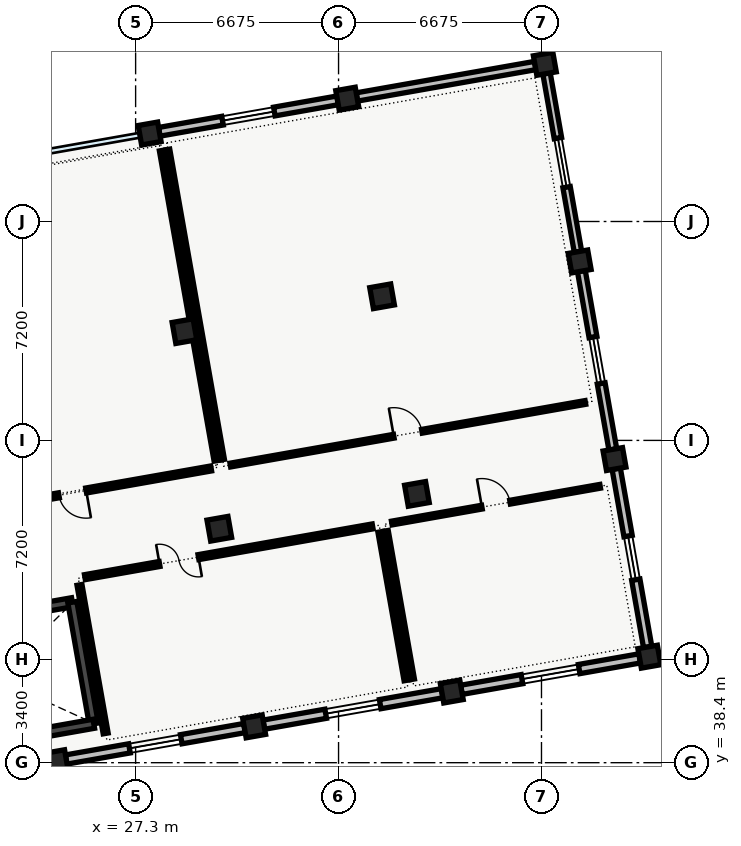
"""IFC4 building model, lengths in metres.
Left out: names, types, materials, properties, quantities, classifications, styles, units other than length and angle.
Written with IfcOpenShell. Run it as: python <this file> out.ifc"""

import sys

from ifc_helpers import new_model, si_unit, direction, frame, frame_2d, origin, origin_2d, place, context, subcontext, project, spatial, rectangle, extrude, element, fill, save


model = new_model("IFC4")
c1 = context("Model", 3, precision=1e-05, world=origin(), true_north=direction((0.0, 1.0)))
c2 = subcontext(c1, "Body", "Model", "MODEL_VIEW")
j1 = project(units=[si_unit("LENGTHUNIT", "METRE"), si_unit("PLANEANGLEUNIT", "RADIAN")], contexts=[c1])
p1 = place(None, origin())
s1 = spatial("IfcSite", under=j1, at=p1, CompositionType="ELEMENT")
p2 = place(p1, origin())
s2 = spatial("IfcBuilding", under=s1, at=p2, CompositionType="ELEMENT")
p3 = place(p2, frame((0.0, 0.0, 14.1)))
s3 = spatial("IfcBuildingStorey", under=s2, at=p3, CompositionType="ELEMENT", Elevation=14.1)
for number, where, z_axis, x_axis in (
    (1, (24.699, 38.448, 0.0), (0.0, 0.0, 1.0), (0.985, 0.174, 0.0)),
    (2, (31.199, 39.594, 0.0), (0.0, 0.0, 1.0), (0.985, 0.174, 0.0)),
):
    element("IfcColumn", number, at=place(p3, frame(where, z_axis=z_axis, x_axis=x_axis)), inside=s3, PredefinedType="COLUMN", context=c2, shape_type="SweptSolid", body=[
        extrude(rectangle(XDim=0.65, YDim=0.65, at=origin_2d()), origin(), (0.0, 0.0, 1.0), 4.31),
    ])
for number, where, z_axis, x_axis in (
    (3, (30.053, 46.094, 0.0), (0.0, 0.0, 1.0), (0.985, 0.174, 0.0)),
    (4, (28.907, 52.594, 0.0), (0.0, 0.0, 1.0), (0.985, 0.174, 0.0)),
):
    element("IfcColumn", number, at=place(p3, frame(where, z_axis=z_axis, x_axis=x_axis)), inside=s3, PredefinedType="COLUMN", context=c2, shape_type="SweptSolid", body=[
        extrude(rectangle(XDim=0.7, YDim=0.7, at=origin_2d()), origin(), (0.0, 0.0, 1.0), 4.31),
    ])
for number, where, z_axis, x_axis in (
    (5, (27.761, 59.094, 0.0), (0.0, 0.0, 1.0), (0.985, 0.174, 0.0)),
    (6, (37.699, 40.74, 0.0), (0.0, 0.0, 1.0), (0.985, 0.174, 0.0)),
):
    element("IfcColumn", number, at=place(p3, frame(where, z_axis=z_axis, x_axis=x_axis)), inside=s3, PredefinedType="COLUMN", context=c2, shape_type="SweptSolid", body=[
        extrude(rectangle(XDim=0.65, YDim=0.65, at=origin_2d()), origin(), (0.0, 0.0, 1.0), 4.31),
    ])
for number, where, z_axis, x_axis in (
    (7, (36.552, 47.24, 0.0), (0.0, 0.0, 1.0), (0.985, 0.174, 0.0)),
    (8, (35.406, 53.74, 0.0), (0.0, 0.0, 1.0), (0.985, 0.174, 0.0)),
):
    element("IfcColumn", number, at=place(p3, frame(where, z_axis=z_axis, x_axis=x_axis)), inside=s3, PredefinedType="COLUMN", context=c2, shape_type="SweptSolid", body=[
        extrude(rectangle(XDim=0.7, YDim=0.7, at=origin_2d()), origin(), (0.0, 0.0, 1.0), 4.31),
    ])
for number, where, z_axis, x_axis in (
    (9, (34.26, 60.24, 0.0), (0.0, 0.0, 1.0), (0.985, 0.174, 0.0)),
    (10, (44.198, 41.886, 0.0), (0.0, 0.0, 1.0), (0.985, 0.174, 0.0)),
    (11, (43.052, 48.386, 0.0), (0.0, 0.0, 1.0), (0.985, 0.174, 0.0)),
    (12, (41.906, 54.886, 0.0), (0.0, 0.0, 1.0), (0.985, 0.174, 0.0)),
    (13, (40.76, 61.386, 0.0), (0.0, 0.0, 1.0), (0.985, 0.174, 0.0)),
):
    element("IfcColumn", number, at=place(p3, frame(where, z_axis=z_axis, x_axis=x_axis)), inside=s3, PredefinedType="COLUMN", context=c2, shape_type="SweptSolid", body=[
        extrude(rectangle(XDim=0.65, YDim=0.65, at=origin_2d()), origin(), (0.0, 0.0, 1.0), 4.31),
    ])
p4 = place(p3, frame((28.076, 59.149, 0.0), z_axis=(0.0, 0.0, 1.0), x_axis=(0.98480829201, 0.173645120828, 0.0)))
e14 = element("IfcWall", 14, at=p4, inside=s3, PredefinedType="STANDARD", context=c2, shape_type="SweptSolid", body=[
    extrude(rectangle(XDim=5.96, YDim=0.29, at=frame_2d((2.98, 0.0))), origin(), (0.0, 0.0, 1.0), 3.795),
])
p5 = place(p4, frame((2.115, 0.0, 0.95)))
e15 = element("IfcOpeningElement", 15, at=p5, cuts=e14, PredefinedType="OPENING", context=c2, shape_type="SweptSolid", body=[
    extrude(rectangle(XDim=1.73, YDim=1.36, at=frame_2d((0.865, 0.68))), frame((0.0, 0.145, 0.0), z_axis=(0.0, -1.0, 0.0), x_axis=(1.0, 0.0, 0.0)), (0.0, 0.0, 1.0), 0.29),
])
p6 = place(p3, frame((34.575, 60.295, 0.0), z_axis=(0.0, 0.0, 1.0), x_axis=(0.984809527099, 0.173638116021, 0.0)))
e16 = element("IfcWall", 16, at=p6, inside=s3, PredefinedType="STANDARD", context=c2, shape_type="SweptSolid", body=[
    extrude(rectangle(XDim=5.96, YDim=0.275, at=frame_2d((2.98, 0.0))), origin(), (0.0, 0.0, 1.0), 3.795),
])
p7 = place(p3, frame((40.816, 61.071, 0.0), z_axis=(0.0, 0.0, 1.0), x_axis=(0.173645120828, -0.98480829201, 0.0)))
e17 = element("IfcWall", 17, at=p7, inside=s3, PredefinedType="STANDARD", context=c2, shape_type="SweptSolid", body=[
    extrude(rectangle(XDim=5.96, YDim=0.245, at=frame_2d((2.98, 0.0))), origin(), (0.0, 0.0, 1.0), 3.795),
])
p8 = place(p7, frame((2.16, 0.0, 0.95)))
e18 = element("IfcOpeningElement", 18, at=p8, cuts=e17, PredefinedType="OPENING", context=c2, shape_type="SweptSolid", body=[
    extrude(rectangle(XDim=1.64, YDim=1.48, at=frame_2d((0.82, 0.74))), frame((0.0, 0.123, 0.0), z_axis=(0.0, -1.0, 0.0), x_axis=(1.0, 0.0, 0.0)), (0.0, 0.0, 1.0), 0.245),
])
p9 = place(p3, frame((41.962, 54.571, 0.0), z_axis=(0.0, 0.0, 1.0), x_axis=(0.173645120828, -0.98480829201, 0.0)))
e19 = element("IfcWall", 19, at=p9, inside=s3, PredefinedType="STANDARD", context=c2, shape_type="SweptSolid", body=[
    extrude(rectangle(XDim=5.96, YDim=0.26, at=frame_2d((2.98, 0.0))), origin(), (0.0, 0.0, 1.0), 3.795),
])
p10 = place(p9, frame((2.205, 0.0, 0.95)))
e20 = element("IfcOpeningElement", 20, at=p10, cuts=e19, PredefinedType="OPENING", context=c2, shape_type="SweptSolid", body=[
    extrude(rectangle(XDim=1.55, YDim=1.46, at=frame_2d((0.775, 0.73))), frame((0.0, 0.13, 0.0), z_axis=(0.0, -1.0, 0.0), x_axis=(1.0, 0.0, 0.0)), (0.0, 0.0, 1.0), 0.26),
])
p11 = place(p3, frame((43.108, 48.071, 0.0), z_axis=(0.0, 0.0, 1.0), x_axis=(0.173645120828, -0.98480829201, 0.0)))
e21 = element("IfcWall", 21, at=p11, inside=s3, PredefinedType="STANDARD", context=c2, shape_type="SweptSolid", body=[
    extrude(rectangle(XDim=5.96, YDim=0.275, at=frame_2d((2.98, 0.0))), origin(), (0.0, 0.0, 1.0), 3.795),
])
p12 = place(p11, frame((2.25, 0.0, 0.95)))
e22 = element("IfcOpeningElement", 22, at=p12, cuts=e21, PredefinedType="OPENING", context=c2, shape_type="SweptSolid", body=[
    extrude(rectangle(XDim=1.46, YDim=1.44, at=frame_2d((0.73, 0.72))), frame((0.0, 0.137, 0.0), z_axis=(0.0, -1.0, 0.0), x_axis=(1.0, 0.0, 0.0)), (0.0, 0.0, 1.0), 0.275),
])
p13 = place(p3, frame((43.883, 41.831, 0.0), z_axis=(0.0, 0.0, 1.0), x_axis=(-0.98480829201, -0.173645120828, 0.0)))
e23 = element("IfcWall", 23, at=p13, inside=s3, PredefinedType="STANDARD", context=c2, shape_type="SweptSolid", body=[
    extrude(rectangle(XDim=5.96, YDim=0.305, at=frame_2d((2.98, 0.0))), origin(), (0.0, 0.0, 1.0), 3.795),
])
p14 = place(p13, frame((2.025, 0.0, 0.95)))
e24 = element("IfcOpeningElement", 24, at=p14, cuts=e23, PredefinedType="OPENING", context=c2, shape_type="SweptSolid", body=[
    extrude(rectangle(XDim=1.91, YDim=1.4, at=frame_2d((0.955, 0.7))), frame((0.0, 0.152, 0.0), z_axis=(0.0, -1.0, 0.0), x_axis=(1.0, 0.0, 0.0)), (0.0, 0.0, 1.0), 0.305),
])
p15 = place(p3, frame((37.384, 40.685, 0.0), z_axis=(0.0, 0.0, 1.0), x_axis=(-0.98480829201, -0.173645120828, 0.0)))
e25 = element("IfcWall", 25, at=p15, inside=s3, PredefinedType="STANDARD", context=c2, shape_type="SweptSolid", body=[
    extrude(rectangle(XDim=5.96, YDim=0.305, at=frame_2d((2.98, 0.0))), origin(), (0.0, 0.0, 1.0), 3.795),
])
p16 = place(p15, frame((2.07, 0.0, 0.95)))
e26 = element("IfcOpeningElement", 26, at=p16, cuts=e25, PredefinedType="OPENING", context=c2, shape_type="SweptSolid", body=[
    extrude(rectangle(XDim=1.82, YDim=1.38, at=frame_2d((0.91, 0.69))), frame((0.0, 0.152, 0.0), z_axis=(0.0, -1.0, 0.0), x_axis=(1.0, 0.0, 0.0)), (0.0, 0.0, 1.0), 0.305),
])
p17 = place(p3, frame((30.884, 39.539, 0.0), z_axis=(0.0, 0.0, 1.0), x_axis=(-0.98480829201, -0.173645120828, 0.0)))
e27 = element("IfcWall", 27, at=p17, inside=s3, PredefinedType="STANDARD", context=c2, shape_type="SweptSolid", body=[
    extrude(rectangle(XDim=5.96, YDim=0.305, at=frame_2d((2.98, 0.0))), origin(), (0.0, 0.0, 1.0), 3.795),
])
p18 = place(p17, frame((2.115, 0.0, 0.95)))
e28 = element("IfcOpeningElement", 28, at=p18, cuts=e27, PredefinedType="OPENING", context=c2, shape_type="SweptSolid", body=[
    extrude(rectangle(XDim=1.73, YDim=1.36, at=frame_2d((0.865, 0.68))), frame((0.0, 0.152, 0.0), z_axis=(0.0, -1.0, 0.0), x_axis=(1.0, 0.0, 0.0)), (0.0, 0.0, 1.0), 0.305),
])
p19 = place(p3, frame((17.863, 42.381, 0.0), z_axis=(0.0, 0.0, 1.0), x_axis=(0.984808225754, 0.173645496596, 0.0)))
e29 = element("IfcWall", 29, at=p19, inside=s3, PredefinedType="SHEAR", context=c2, shape_type="SweptSolid", body=[
    extrude(rectangle(XDim=7.47, YDim=0.3, at=frame_2d((3.735, 0.0))), origin(), (0.0, 0.0, 1.0), 4.28),
])
p20 = place(p19, frame((0.18, 0.0, 0.0)))
e30 = element("IfcOpeningElement", 30, at=p20, cuts=e29, PredefinedType="OPENING", context=c2, shape_type="SweptSolid", body=[
    extrude(rectangle(XDim=1.24, YDim=2.15, at=frame_2d((0.62, 1.075))), frame((0.0, 0.15, 0.0), z_axis=(0.0, -1.0, 0.0), x_axis=(1.0, 0.0, 0.0)), (0.0, 0.0, 1.0), 0.3),
])
p21 = place(p3, frame((25.219, 43.678, 0.0), z_axis=(0.0, 0.0, 1.0), x_axis=(0.173665267602, -0.984804739443, 0.0)))
e31 = element("IfcWall", 31, at=p21, inside=s3, PredefinedType="SHEAR", context=c2, shape_type="SweptSolid", body=[
    extrude(rectangle(XDim=4.06, YDim=0.3, at=frame_2d((2.03, 0.0))), origin(), (0.0, 0.0, 1.0), 4.28),
])
p22 = place(p3, frame((25.924, 39.68, 0.0), z_axis=(0.0, 0.0, 1.0), x_axis=(-0.984809211193, -0.173639907711, 0.0)))
e32 = element("IfcWall", 32, at=p22, inside=s3, PredefinedType="SHEAR", context=c2, shape_type="SweptSolid", body=[
    extrude(rectangle(XDim=7.47, YDim=0.3, at=frame_2d((3.735, 0.0))), origin(), (0.0, 0.0, 1.0), 4.28),
])
p23 = place(p3, frame((20.665, 46.469, 0.0), z_axis=(0.0, 0.0, 1.0), x_axis=(0.984804784872, 0.173665009985, 0.0)))
e33 = element("IfcWall", 33, at=p23, inside=s3, PredefinedType="PARTITIONING", context=c2, shape_type="SweptSolid", body=[
    extrude(rectangle(XDim=9.26, YDim=0.165, at=frame_2d((4.63, 0.0))), origin(), (0.0, 0.0, 1.0), 3.895),
])
p24 = place(p23, frame((4.175, 0.0, 0.0)))
e34 = element("IfcOpeningElement", 34, at=p24, cuts=e33, PredefinedType="OPENING", context=c2, shape_type="SweptSolid", body=[
    extrude(rectangle(XDim=0.91, YDim=2.08, at=frame_2d((0.455, 1.04))), frame((0.0, 0.083, 0.0), z_axis=(0.0, -1.0, 0.0), x_axis=(1.0, 0.0, 0.0)), (0.0, 0.0, 1.0), 0.165),
])
p25 = place(p3, frame((29.963, 48.333, 0.0), z_axis=(0.0, 0.0, 1.0), x_axis=(-0.173658960975, 0.984805851563, 0.0)))
e35 = element("IfcWall", 35, at=p25, inside=s3, PredefinedType="PARTITIONING", context=c2, shape_type="SweptSolid", body=[
    extrude(rectangle(XDim=10.36, YDim=0.165, at=frame_2d((5.18, 0.0))), origin(), (0.0, 0.0, 1.0), 3.695),
])
p26 = place(p3, frame((30.415, 48.189, 0.0), z_axis=(0.0, 0.0, 1.0), x_axis=(0.984810073067, 0.173635019467, 0.0)))
e36 = element("IfcWall", 36, at=p26, inside=s3, PredefinedType="PARTITIONING", context=c2, shape_type="SweptSolid", body=[
    extrude(rectangle(XDim=11.86, YDim=0.125, at=frame_2d((5.93, 0.0))), origin(), (0.0, 0.0, 1.0), 3.95),
])
p27 = place(p26, frame((5.46, 0.0, 0.0)))
e37 = element("IfcOpeningElement", 37, at=p27, cuts=e36, PredefinedType="OPENING", context=c2, shape_type="SweptSolid", body=[
    extrude(rectangle(XDim=0.94, YDim=2.12, at=frame_2d((0.47, 1.06))), frame((0.0, 0.062, 0.0), z_axis=(0.0, -1.0, 0.0), x_axis=(1.0, 0.0, 0.0)), (0.0, 0.0, 1.0), 0.125),
])
p28 = place(p3, frame((28.361, 58.57, 0.0), z_axis=(0.0, 0.0, 1.0), x_axis=(0.173632075677, -0.984810592092, 0.0)))
e38 = element("IfcWall", 38, at=p28, inside=s3, PredefinedType="PARTITIONING", context=c2, shape_type="SweptSolid", body=[
    extrude(rectangle(XDim=10.36, YDim=0.125, at=frame_2d((5.18, 0.0))), origin(), (0.0, 0.0, 1.0), 3.95),
])
p29 = place(p3, frame((36.212, 41.108, 0.0), z_axis=(0.0, 0.0, 1.0), x_axis=(-0.173611232021, 0.984814266812, 0.0)))
e39 = element("IfcWall", 39, at=p29, inside=s3, PredefinedType="PARTITIONING", context=c2, shape_type="SweptSolid", body=[
    extrude(rectangle(XDim=4.96, YDim=0.165, at=frame_2d((2.48, 0.0))), origin(), (0.0, 0.0, 1.0), 3.95),
])
p30 = place(p3, frame((35.096, 46.171, 0.0), z_axis=(0.0, 0.0, 1.0), x_axis=(-0.98480912325, -0.173640406486, 0.0)))
e40 = element("IfcWall", 40, at=p30, inside=s3, PredefinedType="PARTITIONING", context=c2, shape_type="SweptSolid", body=[
    extrude(rectangle(XDim=9.61, YDim=0.165, at=frame_2d((4.805, 0.0))), origin(), (0.0, 0.0, 1.0), 3.95),
])
p31 = place(p30, frame((5.817, 0.0, 0.0)))
e41 = element("IfcOpeningElement", 41, at=p31, cuts=e40, PredefinedType="OPENING", context=c2, shape_type="SweptSolid", body=[
    extrude(rectangle(XDim=1.3, YDim=2.18, at=frame_2d((0.65, 1.09))), frame((0.0, 0.083, 0.0), z_axis=(0.0, -1.0, 0.0), x_axis=(1.0, 0.0, 0.0)), (0.0, 0.0, 1.0), 0.165),
])
p32 = place(p3, frame((25.454, 44.247, 0.0), z_axis=(0.0, 0.0, 1.0), x_axis=(0.173658971256, -0.98480584975, 0.0)))
e42 = element("IfcWall", 42, at=p32, inside=s3, PredefinedType="PARTITIONING", context=c2, shape_type="SweptSolid", body=[
    extrude(rectangle(XDim=4.96, YDim=0.165, at=frame_2d((2.48, 0.0))), origin(), (0.0, 0.0, 1.0), 3.95),
])
p33 = place(p3, frame((42.581, 47.491, 0.0), z_axis=(0.0, 0.0, 1.0), x_axis=(-0.984804033539, -0.173669270527, 0.0)))
e43 = element("IfcWall", 43, at=p33, inside=s3, PredefinedType="PARTITIONING", context=c2, shape_type="SweptSolid", body=[
    extrude(rectangle(XDim=6.96, YDim=0.125, at=frame_2d((3.48, 0.0))), origin(), (0.0, 0.0, 1.0), 3.95),
])
p34 = place(p33, frame((3.01, 0.0, 0.0)))
e44 = element("IfcOpeningElement", 44, at=p34, cuts=e43, PredefinedType="OPENING", context=c2, shape_type="SweptSolid", body=[
    extrude(rectangle(XDim=0.94, YDim=2.12, at=frame_2d((0.47, 1.06))), frame((0.0, 0.062, 0.0), z_axis=(0.0, -1.0, 0.0), x_axis=(1.0, 0.0, 0.0)), (0.0, 0.0, 1.0), 0.125),
])
p35 = place(p3, frame((35.548, 46.027, 0.0), z_axis=(0.0, 0.0, 1.0), x_axis=(0.173650553511, -0.984807334084, 0.0)))
e45 = element("IfcWall", 45, at=p35, inside=s3, PredefinedType="PARTITIONING", context=c2, shape_type="SweptSolid", body=[
    extrude(rectangle(XDim=4.96, YDim=0.125, at=frame_2d((2.48, 0.0))), origin(), (0.0, 0.0, 1.0), 3.95),
])
p36 = place(p5, origin())
e46 = element("IfcWindow", 46, at=p36, inside=s3, PartitioningType="SINGLE_PANEL", PredefinedType="WINDOW", context=c2, shape_type="SweptSolid", body=[
    extrude(rectangle(XDim=1.73, YDim=1.36, at=frame_2d((0.865, 0.68))), frame((0.0, 0.03, 0.0), z_axis=(0.0, -1.0, 0.0), x_axis=(1.0, 0.0, 0.0)), (0.0, 0.0, 1.0), 0.06),
])
fill(e15, e46)
p37 = place(p8, origin())
e47 = element("IfcWindow", 47, at=p37, inside=s3, PartitioningType="SINGLE_PANEL", PredefinedType="WINDOW", context=c2, shape_type="SweptSolid", body=[
    extrude(rectangle(XDim=1.64, YDim=1.48, at=frame_2d((0.82, 0.74))), frame((0.0, 0.03, 0.0), z_axis=(0.0, -1.0, 0.0), x_axis=(1.0, 0.0, 0.0)), (0.0, 0.0, 1.0), 0.06),
])
fill(e18, e47)
p38 = place(p10, origin())
e48 = element("IfcWindow", 48, at=p38, inside=s3, PartitioningType="SINGLE_PANEL", PredefinedType="WINDOW", context=c2, shape_type="SweptSolid", body=[
    extrude(rectangle(XDim=1.55, YDim=1.46, at=frame_2d((0.775, 0.73))), frame((0.0, 0.03, 0.0), z_axis=(0.0, -1.0, 0.0), x_axis=(1.0, 0.0, 0.0)), (0.0, 0.0, 1.0), 0.06),
])
fill(e20, e48)
p39 = place(p12, origin())
e49 = element("IfcWindow", 49, at=p39, inside=s3, PartitioningType="SINGLE_PANEL", PredefinedType="WINDOW", context=c2, shape_type="SweptSolid", body=[
    extrude(rectangle(XDim=1.46, YDim=1.44, at=frame_2d((0.73, 0.72))), frame((0.0, 0.03, 0.0), z_axis=(0.0, -1.0, 0.0), x_axis=(1.0, 0.0, 0.0)), (0.0, 0.0, 1.0), 0.06),
])
fill(e22, e49)
p40 = place(p14, origin())
e50 = element("IfcWindow", 50, at=p40, inside=s3, PartitioningType="SINGLE_PANEL", PredefinedType="WINDOW", context=c2, shape_type="SweptSolid", body=[
    extrude(rectangle(XDim=1.91, YDim=1.4, at=frame_2d((0.955, 0.7))), frame((0.0, 0.03, 0.0), z_axis=(0.0, -1.0, 0.0), x_axis=(1.0, 0.0, 0.0)), (0.0, 0.0, 1.0), 0.06),
])
fill(e24, e50)
p41 = place(p16, origin())
e51 = element("IfcWindow", 51, at=p41, inside=s3, PartitioningType="SINGLE_PANEL", PredefinedType="WINDOW", context=c2, shape_type="SweptSolid", body=[
    extrude(rectangle(XDim=1.82, YDim=1.38, at=frame_2d((0.91, 0.69))), frame((0.0, 0.03, 0.0), z_axis=(0.0, -1.0, 0.0), x_axis=(1.0, 0.0, 0.0)), (0.0, 0.0, 1.0), 0.06),
])
fill(e26, e51)
p42 = place(p18, origin())
e52 = element("IfcWindow", 52, at=p42, inside=s3, PartitioningType="SINGLE_PANEL", PredefinedType="WINDOW", context=c2, shape_type="SweptSolid", body=[
    extrude(rectangle(XDim=1.73, YDim=1.36, at=frame_2d((0.865, 0.68))), frame((0.0, 0.03, 0.0), z_axis=(0.0, -1.0, 0.0), x_axis=(1.0, 0.0, 0.0)), (0.0, 0.0, 1.0), 0.06),
])
fill(e28, e52)
p43 = place(p24, origin())
e53 = element("IfcDoor", 53, at=p43, inside=s3, OperationType="SINGLE_SWING_RIGHT", PredefinedType="DOOR", context=c2, shape_type="SweptSolid", body=[
    extrude(rectangle(XDim=0.91, YDim=2.08, at=frame_2d((0.455, 1.04))), frame((0.0, 0.025, 0.0), z_axis=(0.0, -1.0, 0.0), x_axis=(1.0, 0.0, 0.0)), (0.0, 0.0, 1.0), 0.05),
])
fill(e34, e53)
p44 = place(p27, origin())
e54 = element("IfcDoor", 54, at=p44, inside=s3, OperationType="SINGLE_SWING_LEFT", PredefinedType="DOOR", context=c2, shape_type="SweptSolid", body=[
    extrude(rectangle(XDim=0.94, YDim=2.12, at=frame_2d((0.47, 1.06))), frame((0.0, 0.025, 0.0), z_axis=(0.0, -1.0, 0.0), x_axis=(1.0, 0.0, 0.0)), (0.0, 0.0, 1.0), 0.05),
])
fill(e37, e54)
p45 = place(p31, origin())
e55 = element("IfcDoor", 55, at=p45, inside=s3, OperationType="DOUBLE_DOOR_SINGLE_SWING", PredefinedType="DOOR", context=c2, shape_type="SweptSolid", body=[
    extrude(rectangle(XDim=1.3, YDim=2.18, at=frame_2d((0.65, 1.09))), frame((0.0, 0.025, 0.0), z_axis=(0.0, -1.0, 0.0), x_axis=(1.0, 0.0, 0.0)), (0.0, 0.0, 1.0), 0.05),
])
fill(e41, e55)
p46 = place(p34, origin())
e56 = element("IfcDoor", 56, at=p46, inside=s3, OperationType="SINGLE_SWING_RIGHT", PredefinedType="DOOR", context=c2, shape_type="SweptSolid", body=[
    extrude(rectangle(XDim=0.94, YDim=2.12, at=frame_2d((0.47, 1.06))), frame((0.0, 0.025, 0.0), z_axis=(0.0, -1.0, 0.0), x_axis=(1.0, 0.0, 0.0)), (0.0, 0.0, 1.0), 0.05),
])
fill(e44, e56)
save(model, sys.argv[1])
